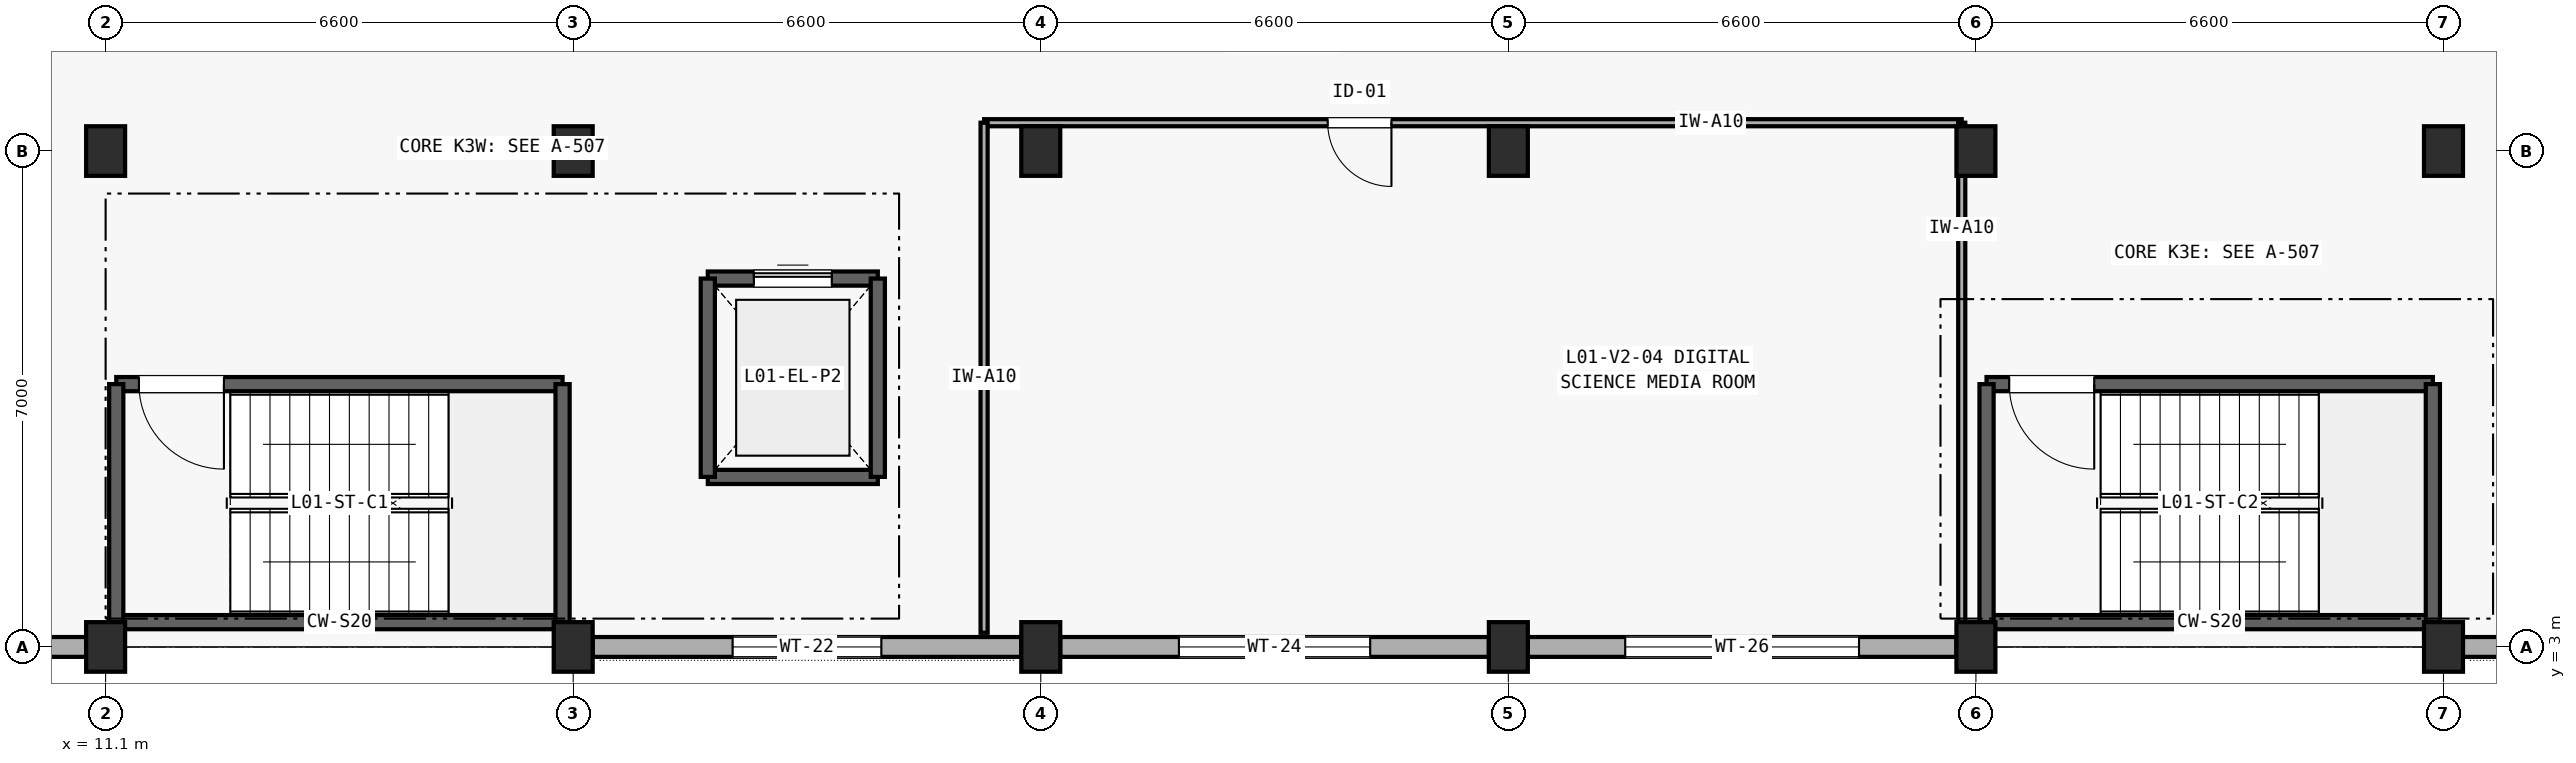
"""IFC4 building model, lengths in metres.
Left out: names, types, materials, properties, quantities, classifications, styles, units other than length and angle.
Written with IfcOpenShell. Run it as: python <this file> out.ifc"""

import sys

from ifc_helpers import new_model, si_unit, direction, frame, frame_2d, origin, origin_2d, place, context, subcontext, project, spatial, rectangle, extrude, element, fill, save


model = new_model("IFC4")
c1 = context("Model", 3, precision=1e-05, world=origin(), true_north=direction((0.0, 1.0)))
c2 = subcontext(c1, "Body", "Model", "MODEL_VIEW")
j1 = project(units=[si_unit("LENGTHUNIT", "METRE"), si_unit("PLANEANGLEUNIT", "RADIAN")], contexts=[c1])
p1 = place(None, origin())
s1 = spatial("IfcSite", under=j1, at=p1, CompositionType="ELEMENT")
p2 = place(p1, origin())
s2 = spatial("IfcBuilding", under=s1, at=p2, CompositionType="ELEMENT")
p3 = place(p2, frame((0.0, 0.0, 4.2)))
s3 = spatial("IfcBuildingStorey", under=s2, at=p3, CompositionType="ELEMENT", Elevation=4.2)
for number, where, z_axis, x_axis in (
    (1, (11.1, 3.0, 0.0), (0.0, 0.0, 1.0), (1.0, 0.0, 0.0)),
    (2, (11.1, 10.0, 0.0), (0.0, 0.0, 1.0), (1.0, 0.0, 0.0)),
    (3, (17.7, 3.0, 0.0), (0.0, 0.0, 1.0), (1.0, 0.0, 0.0)),
    (4, (17.7, 10.0, 0.0), (0.0, 0.0, 1.0), (1.0, 0.0, 0.0)),
    (5, (24.3, 3.0, 0.0), (0.0, 0.0, 1.0), (1.0, 0.0, 0.0)),
    (6, (24.3, 10.0, 0.0), (0.0, 0.0, 1.0), (1.0, 0.0, 0.0)),
    (7, (30.9, 3.0, 0.0), (0.0, 0.0, 1.0), (1.0, 0.0, 0.0)),
    (8, (30.9, 10.0, 0.0), (0.0, 0.0, 1.0), (1.0, 0.0, 0.0)),
    (9, (37.5, 3.0, 0.0), (0.0, 0.0, 1.0), (1.0, 0.0, 0.0)),
    (10, (37.5, 10.0, 0.0), (0.0, 0.0, 1.0), (1.0, 0.0, 0.0)),
    (11, (44.1, 3.0, 0.0), (0.0, 0.0, 1.0), (1.0, 0.0, 0.0)),
    (12, (44.1, 10.0, 0.0), (0.0, 0.0, 1.0), (1.0, 0.0, 0.0)),
):
    element("IfcColumn", number, at=place(p3, frame(where, z_axis=z_axis, x_axis=x_axis)), inside=s3, PredefinedType="COLUMN", context=c2, shape_type="SweptSolid", body=[
        extrude(rectangle(XDim=0.55, YDim=0.7, at=origin_2d()), origin(), (0.0, 0.0, 1.0), 4.2),
    ])
p4 = place(p3, frame((4.775, 3.0, 0.0), z_axis=(0.0, 0.0, 1.0), x_axis=(1.0, 0.0, 0.0)))
e13 = element("IfcWall", 13, at=p4, inside=s3, PredefinedType="SOLIDWALL", context=c2, shape_type="SweptSolid", body=[
    extrude(rectangle(XDim=6.05, YDim=0.28, at=frame_2d((3.025, 0.0))), origin(), (0.0, 0.0, 1.0), 3.135),
])
p5 = place(p4, frame((1.775, 0.0, 0.85)))
e14 = element("IfcOpeningElement", 14, at=p5, cuts=e13, PredefinedType="OPENING", context=c2, shape_type="SweptSolid", body=[
    extrude(rectangle(XDim=2.5, YDim=1.25, at=frame_2d((1.25, 0.625))), frame((0.0, 0.15, 0.0), z_axis=(0.0, -1.0, 0.0), x_axis=(1.0, 0.0, 0.0)), (0.0, 0.0, 1.0), 0.3),
])
p6 = place(p3, frame((17.975, 3.0, 0.0), z_axis=(0.0, 0.0, 1.0), x_axis=(1.0, 0.0, 0.0)))
e15 = element("IfcWall", 15, at=p6, inside=s3, PredefinedType="SOLIDWALL", context=c2, shape_type="SweptSolid", body=[
    extrude(rectangle(XDim=6.05, YDim=0.28, at=frame_2d((3.025, 0.0))), origin(), (0.0, 0.0, 1.0), 3.285),
])
p7 = place(p6, frame((1.975, 0.0, 0.85)))
e16 = element("IfcOpeningElement", 16, at=p7, cuts=e15, PredefinedType="OPENING", context=c2, shape_type="SweptSolid", body=[
    extrude(rectangle(XDim=2.1, YDim=1.6, at=frame_2d((1.05, 0.8))), frame((0.0, 0.15, 0.0), z_axis=(0.0, -1.0, 0.0), x_axis=(1.0, 0.0, 0.0)), (0.0, 0.0, 1.0), 0.3),
])
p8 = place(p3, frame((24.575, 3.0, 0.0), z_axis=(0.0, 0.0, 1.0), x_axis=(1.0, 0.0, 0.0)))
e17 = element("IfcWall", 17, at=p8, inside=s3, PredefinedType="SOLIDWALL", context=c2, shape_type="SweptSolid", body=[
    extrude(rectangle(XDim=6.05, YDim=0.28, at=frame_2d((3.025, 0.0))), origin(), (0.0, 0.0, 1.0), 3.285),
])
p9 = place(p8, frame((1.675, 0.0, 0.85)))
e18 = element("IfcOpeningElement", 18, at=p9, cuts=e17, PredefinedType="OPENING", context=c2, shape_type="SweptSolid", body=[
    extrude(rectangle(XDim=2.7, YDim=1.6, at=frame_2d((1.35, 0.8))), frame((0.0, 0.15, 0.0), z_axis=(0.0, -1.0, 0.0), x_axis=(1.0, 0.0, 0.0)), (0.0, 0.0, 1.0), 0.3),
])
p10 = place(p3, frame((31.175, 3.0, 0.0), z_axis=(0.0, 0.0, 1.0), x_axis=(1.0, 0.0, 0.0)))
e19 = element("IfcWall", 19, at=p10, inside=s3, PredefinedType="SOLIDWALL", context=c2, shape_type="SweptSolid", body=[
    extrude(rectangle(XDim=6.05, YDim=0.28, at=frame_2d((3.025, 0.0))), origin(), (0.0, 0.0, 1.0), 3.365),
])
p11 = place(p10, frame((1.375, 0.0, 0.85)))
e20 = element("IfcOpeningElement", 20, at=p11, cuts=e19, PredefinedType="OPENING", context=c2, shape_type="SweptSolid", body=[
    extrude(rectangle(XDim=3.3, YDim=1.6, at=frame_2d((1.65, 0.8))), frame((0.0, 0.15, 0.0), z_axis=(0.0, -1.0, 0.0), x_axis=(1.0, 0.0, 0.0)), (0.0, 0.0, 1.0), 0.3),
])
p12 = place(p3, frame((44.375, 3.0, 0.0), z_axis=(0.0, 0.0, 1.0), x_axis=(1.0, 0.0, 0.0)))
e21 = element("IfcWall", 21, at=p12, inside=s3, PredefinedType="SOLIDWALL", context=c2, shape_type="SweptSolid", body=[
    extrude(rectangle(XDim=6.05, YDim=0.28, at=frame_2d((3.025, 0.0))), origin(), (0.0, 0.0, 1.0), 3.385),
])
p13 = place(p12, frame((2.225, 0.0, 0.85)))
e22 = element("IfcOpeningElement", 22, at=p13, cuts=e21, PredefinedType="OPENING", context=c2, shape_type="SweptSolid", body=[
    extrude(rectangle(XDim=1.6, YDim=1.45, at=frame_2d((0.8, 0.725))), frame((0.0, 0.15, 0.0), z_axis=(0.0, -1.0, 0.0), x_axis=(1.0, 0.0, 0.0)), (0.0, 0.0, 1.0), 0.3),
])
p14 = place(p3, frame((11.25, 3.35, 0.0), z_axis=(0.0, 0.0, 1.0), x_axis=(1.0, 0.0, 0.0)))
e23 = element("IfcWall", 23, at=p14, inside=s3, PredefinedType="SHEAR", context=c2, shape_type="SweptSolid", body=[
    extrude(rectangle(XDim=6.3, YDim=0.2, at=frame_2d((3.15, 0.0))), origin(), (0.0, 0.0, 1.0), 4.2),
])
p15 = place(p3, frame((11.25, 6.71, 0.0), z_axis=(0.0, 0.0, 1.0), x_axis=(1.0, 0.0, 0.0)))
e24 = element("IfcWall", 24, at=p15, inside=s3, PredefinedType="SHEAR", context=c2, shape_type="SweptSolid", body=[
    extrude(rectangle(XDim=6.3, YDim=0.2, at=frame_2d((3.15, 0.0))), origin(), (0.0, 0.0, 1.0), 4.2),
])
p16 = place(p15, frame((0.32, 0.0, 0.0)))
e25 = element("IfcOpeningElement", 25, at=p16, cuts=e24, PredefinedType="OPENING", context=c2, shape_type="SweptSolid", body=[
    extrude(rectangle(XDim=1.2, YDim=2.15, at=frame_2d((0.6, 1.075))), frame((0.0, 0.11, 0.0), z_axis=(0.0, -1.0, 0.0), x_axis=(1.0, 0.0, 0.0)), (0.0, 0.0, 1.0), 0.22),
])
for number, where, z_axis, x_axis in (
    (26, (11.25, 3.35, 0.0), (0.0, 0.0, 1.0), (0.0, 1.0, 0.0)),
    (27, (17.55, 3.35, 0.0), (0.0, 0.0, 1.0), (0.0, 1.0, 0.0)),
):
    element("IfcWall", number, at=place(p3, frame(where, z_axis=z_axis, x_axis=x_axis)), inside=s3, PredefinedType="SHEAR", context=c2, shape_type="SweptSolid", body=[
        extrude(rectangle(XDim=3.36, YDim=0.2, at=frame_2d((1.68, 0.0))), origin(), (0.0, 0.0, 1.0), 4.2),
    ])
p17 = place(p3, frame((37.65, 3.35, 0.0), z_axis=(0.0, 0.0, 1.0), x_axis=(1.0, 0.0, 0.0)))
e28 = element("IfcWall", 28, at=p17, inside=s3, PredefinedType="SHEAR", context=c2, shape_type="SweptSolid", body=[
    extrude(rectangle(XDim=6.3, YDim=0.2, at=frame_2d((3.15, 0.0))), origin(), (0.0, 0.0, 1.0), 4.2),
])
p18 = place(p3, frame((37.65, 6.71, 0.0), z_axis=(0.0, 0.0, 1.0), x_axis=(1.0, 0.0, 0.0)))
e29 = element("IfcWall", 29, at=p18, inside=s3, PredefinedType="SHEAR", context=c2, shape_type="SweptSolid", body=[
    extrude(rectangle(XDim=6.3, YDim=0.2, at=frame_2d((3.15, 0.0))), origin(), (0.0, 0.0, 1.0), 4.2),
])
p19 = place(p18, frame((0.32, 0.0, 0.0)))
e30 = element("IfcOpeningElement", 30, at=p19, cuts=e29, PredefinedType="OPENING", context=c2, shape_type="SweptSolid", body=[
    extrude(rectangle(XDim=1.2, YDim=2.15, at=frame_2d((0.6, 1.075))), frame((0.0, 0.11, 0.0), z_axis=(0.0, -1.0, 0.0), x_axis=(1.0, 0.0, 0.0)), (0.0, 0.0, 1.0), 0.22),
])
for number, where, z_axis, x_axis in (
    (31, (37.65, 3.35, 0.0), (0.0, 0.0, 1.0), (0.0, 1.0, 0.0)),
    (32, (43.95, 3.35, 0.0), (0.0, 0.0, 1.0), (0.0, 1.0, 0.0)),
):
    element("IfcWall", number, at=place(p3, frame(where, z_axis=z_axis, x_axis=x_axis)), inside=s3, PredefinedType="SHEAR", context=c2, shape_type="SweptSolid", body=[
        extrude(rectangle(XDim=3.36, YDim=0.2, at=frame_2d((1.68, 0.0))), origin(), (0.0, 0.0, 1.0), 4.2),
    ])
p20 = place(p3, frame((19.6, 5.4, 0.0), z_axis=(0.0, 0.0, 1.0), x_axis=(1.0, 0.0, 0.0)))
e33 = element("IfcWall", 33, at=p20, inside=s3, PredefinedType="SHEAR", context=c2, shape_type="SweptSolid", body=[
    extrude(rectangle(XDim=2.4, YDim=0.2, at=frame_2d((1.2, 0.0))), origin(), (0.0, 0.0, 1.0), 4.2),
])
p21 = place(p3, frame((19.6, 8.2, 0.0), z_axis=(0.0, 0.0, 1.0), x_axis=(1.0, 0.0, 0.0)))
e34 = element("IfcWall", 34, at=p21, inside=s3, PredefinedType="SHEAR", context=c2, shape_type="SweptSolid", body=[
    extrude(rectangle(XDim=2.4, YDim=0.2, at=frame_2d((1.2, 0.0))), origin(), (0.0, 0.0, 1.0), 4.2),
])
p22 = place(p21, frame((0.65, 0.0, 0.0)))
e35 = element("IfcOpeningElement", 35, at=p22, cuts=e34, PredefinedType="OPENING", context=c2, shape_type="SweptSolid", body=[
    extrude(rectangle(XDim=1.1, YDim=2.15, at=frame_2d((0.55, 1.075))), frame((0.0, 0.11, 0.0), z_axis=(0.0, -1.0, 0.0), x_axis=(1.0, 0.0, 0.0)), (0.0, 0.0, 1.0), 0.22),
])
for number, where, z_axis, x_axis in (
    (36, (19.6, 5.4, 0.0), (0.0, 0.0, 1.0), (0.0, 1.0, 0.0)),
    (37, (22.0, 5.4, 0.0), (0.0, 0.0, 1.0), (0.0, 1.0, 0.0)),
):
    element("IfcWall", number, at=place(p3, frame(where, z_axis=z_axis, x_axis=x_axis)), inside=s3, PredefinedType="SHEAR", context=c2, shape_type="SweptSolid", body=[
        extrude(rectangle(XDim=2.8, YDim=0.2, at=frame_2d((1.4, 0.0))), origin(), (0.0, 0.0, 1.0), 4.2),
    ])
p23 = place(p3, frame((23.5, 10.4, 0.0), z_axis=(0.0, 0.0, 1.0), x_axis=(1.0, 0.0, 0.0)))
e38 = element("IfcWall", 38, at=p23, inside=s3, PredefinedType="PARTITIONING", context=c2, shape_type="SweptSolid", body=[
    extrude(rectangle(XDim=13.8, YDim=0.1, at=frame_2d((6.9, 0.0))), origin(), (0.0, 0.0, 1.0), 3.9),
])
p24 = place(p23, frame((4.85, 0.0, 0.0)))
e39 = element("IfcOpeningElement", 39, at=p24, cuts=e38, PredefinedType="OPENING", context=c2, shape_type="SweptSolid", body=[
    extrude(rectangle(XDim=0.9, YDim=2.1, at=frame_2d((0.45, 1.05))), frame((0.0, 0.06, 0.0), z_axis=(0.0, -1.0, 0.0), x_axis=(1.0, 0.0, 0.0)), (0.0, 0.0, 1.0), 0.12),
])
for number, where, z_axis, x_axis in (
    (40, (23.5, 3.2, 0.0), (0.0, 0.0, 1.0), (0.0, 1.0, 0.0)),
    (41, (37.3, 3.2, 0.0), (0.0, 0.0, 1.0), (0.0, 1.0, 0.0)),
):
    element("IfcWall", number, at=place(p3, frame(where, z_axis=z_axis, x_axis=x_axis)), inside=s3, PredefinedType="PARTITIONING", context=c2, shape_type="SweptSolid", body=[
        extrude(rectangle(XDim=7.2, YDim=0.1, at=frame_2d((3.6, 0.0))), origin(), (0.0, 0.0, 1.0), 3.9),
    ])
p25 = place(p7, origin())
e42 = element("IfcWindow", 42, at=p25, inside=s3, PartitioningType="SINGLE_PANEL", PredefinedType="WINDOW", context=c2, shape_type="SweptSolid", body=[
    extrude(rectangle(XDim=2.1, YDim=1.6, at=frame_2d((1.05, 0.8))), frame((0.0, 0.03, 0.0), z_axis=(0.0, -1.0, 0.0), x_axis=(1.0, 0.0, 0.0)), (0.0, 0.0, 1.0), 0.06),
])
fill(e16, e42)
p26 = place(p9, origin())
e43 = element("IfcWindow", 43, at=p26, inside=s3, PartitioningType="SINGLE_PANEL", PredefinedType="WINDOW", context=c2, shape_type="SweptSolid", body=[
    extrude(rectangle(XDim=2.7, YDim=1.6, at=frame_2d((1.35, 0.8))), frame((0.0, 0.03, 0.0), z_axis=(0.0, -1.0, 0.0), x_axis=(1.0, 0.0, 0.0)), (0.0, 0.0, 1.0), 0.06),
])
fill(e18, e43)
p27 = place(p11, origin())
e44 = element("IfcWindow", 44, at=p27, inside=s3, PartitioningType="SINGLE_PANEL", PredefinedType="WINDOW", context=c2, shape_type="SweptSolid", body=[
    extrude(rectangle(XDim=3.3, YDim=1.6, at=frame_2d((1.65, 0.8))), frame((0.0, 0.03, 0.0), z_axis=(0.0, -1.0, 0.0), x_axis=(1.0, 0.0, 0.0)), (0.0, 0.0, 1.0), 0.06),
])
fill(e20, e44)
p28 = place(p16, frame((1.2, 0.0, 0.0), z_axis=(0.0, 0.0, 1.0), x_axis=(-1.0, 0.0, 0.0)))
e45 = element("IfcDoor", 45, at=p28, inside=s3, OperationType="SINGLE_SWING_LEFT", PredefinedType="DOOR", context=c2, shape_type="SweptSolid", body=[
    extrude(rectangle(XDim=1.2, YDim=2.15, at=frame_2d((0.6, 1.075))), frame((0.0, 0.025, 0.0), z_axis=(0.0, -1.0, 0.0), x_axis=(1.0, 0.0, 0.0)), (0.0, 0.0, 1.0), 0.05),
])
fill(e25, e45)
p29 = place(p19, frame((1.2, 0.0, 0.0), z_axis=(0.0, 0.0, 1.0), x_axis=(-1.0, 0.0, 0.0)))
e46 = element("IfcDoor", 46, at=p29, inside=s3, OperationType="SINGLE_SWING_LEFT", PredefinedType="DOOR", context=c2, shape_type="SweptSolid", body=[
    extrude(rectangle(XDim=1.2, YDim=2.15, at=frame_2d((0.6, 1.075))), frame((0.0, 0.025, 0.0), z_axis=(0.0, -1.0, 0.0), x_axis=(1.0, 0.0, 0.0)), (0.0, 0.0, 1.0), 0.05),
])
fill(e30, e46)
p30 = place(p22, origin())
e47 = element("IfcDoor", 47, at=p30, inside=s3, OperationType="SLIDING_TO_LEFT", PredefinedType="DOOR", context=c2, shape_type="SweptSolid", body=[
    extrude(rectangle(XDim=1.1, YDim=2.15, at=frame_2d((0.55, 1.075))), frame((0.0, 0.025, 0.0), z_axis=(0.0, -1.0, 0.0), x_axis=(1.0, 0.0, 0.0)), (0.0, 0.0, 1.0), 0.05),
])
fill(e35, e47)
p31 = place(p24, frame((0.9, 0.0, 0.0), z_axis=(0.0, 0.0, 1.0), x_axis=(-1.0, 0.0, 0.0)))
e48 = element("IfcDoor", 48, at=p31, inside=s3, OperationType="SINGLE_SWING_LEFT", PredefinedType="DOOR", context=c2, shape_type="SweptSolid", body=[
    extrude(rectangle(XDim=0.9, YDim=2.1, at=frame_2d((0.45, 1.05))), frame((0.0, 0.025, 0.0), z_axis=(0.0, -1.0, 0.0), x_axis=(1.0, 0.0, 0.0)), (0.0, 0.0, 1.0), 0.05),
])
fill(e39, e48)
save(model, sys.argv[1])
